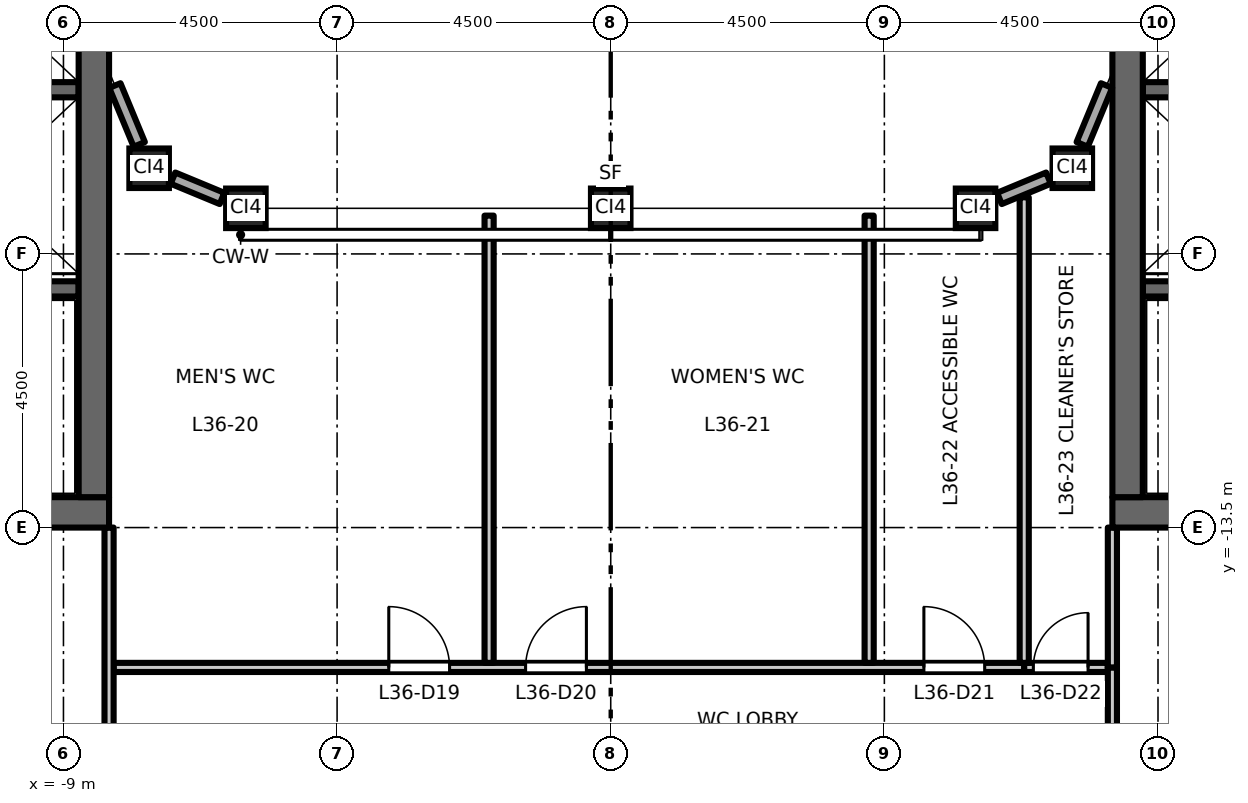
"""IFC4 building model, lengths in metres.
Left out: names, types, materials, properties, quantities, classifications, styles, units other than length and angle.
Written with IfcOpenShell. Run it as: python <this file> out.ifc"""

import sys

from ifc_helpers import new_model, si_unit, direction, frame, frame_2d, origin, origin_2d, place, context, subcontext, project, spatial, rectangle, hollow_rectangle, extrude, element, fill, save


model = new_model("IFC4")
c1 = context("Model", 3, precision=1e-05, world=origin(), true_north=direction((0.0, 1.0)))
c2 = subcontext(c1, "Body", "Model", "MODEL_VIEW")
j1 = project(units=[si_unit("LENGTHUNIT", "METRE"), si_unit("PLANEANGLEUNIT", "RADIAN")], contexts=[c1])
p1 = place(None, origin())
s1 = spatial("IfcSite", under=j1, at=p1, CompositionType="ELEMENT")
p2 = place(p1, origin())
s2 = spatial("IfcBuilding", under=s1, at=p2, CompositionType="ELEMENT")
p3 = place(p2, frame((0.0, 0.0, 167.7)))
s3 = spatial("IfcBuildingStorey", under=s2, at=p3, CompositionType="ELEMENT", Elevation=167.7)
for number, where, z_axis, x_axis in (
    (1, (-7.591, -7.591, 0.0), (0.0, 0.0, 1.0), (1.0, 0.0, 0.0)),
    (2, (-6.0, -8.25, 0.0), (0.0, 0.0, 1.0), (1.0, 0.0, 0.0)),
    (3, (0.0, -8.25, 0.0), (0.0, 0.0, 1.0), (1.0, 0.0, 0.0)),
    (4, (6.0, -8.25, 0.0), (0.0, 0.0, 1.0), (1.0, 0.0, 0.0)),
    (5, (7.591, -7.591, 0.0), (0.0, 0.0, 1.0), (1.0, 0.0, 0.0)),
):
    element("IfcColumn", number, at=place(p3, frame(where, z_axis=z_axis, x_axis=x_axis)), inside=s3, PredefinedType="COLUMN", context=c2, shape_type="SweptSolid", body=[
        extrude(hollow_rectangle(XDim=0.65, YDim=0.65, WallThickness=0.036, at=origin_2d()), origin(), (0.0, 0.0, 1.0), 4.5),
    ])
p4 = place(p3, frame((-8.75, -6.3, 0.0), z_axis=(0.0, 0.0, 1.0), x_axis=(-1.0, 0.0, 0.0)))
e6 = element("IfcWall", 6, at=p4, inside=s3, PredefinedType="SHEAR", context=c2, shape_type="SweptSolid", body=[
    extrude(rectangle(XDim=3.1, YDim=0.25, at=frame_2d((1.55, 0.0))), origin(), (0.0, 0.0, 1.0), 4.35),
])
p5 = place(p3, frame((-8.75, -9.575, 0.0), z_axis=(0.0, 0.0, 1.0), x_axis=(-1.0, 0.0, 0.0)))
e7 = element("IfcWall", 7, at=p5, inside=s3, PredefinedType="SHEAR", context=c2, shape_type="SweptSolid", body=[
    extrude(rectangle(XDim=8.0, YDim=0.25, at=frame_2d((4.0, 0.0))), origin(), (0.0, 0.0, 1.0), 4.35),
])
p6 = place(p5, frame((6.65, 0.0, 0.0)))
e8 = element("IfcOpeningElement", 8, at=p6, cuts=e7, PredefinedType="OPENING", context=c2, shape_type="SweptSolid", body=[
    extrude(rectangle(XDim=1.1, YDim=2.1, at=frame_2d((0.55, 1.05))), frame((0.0, 0.135, 0.0), z_axis=(0.0, -1.0, 0.0), x_axis=(1.0, 0.0, 0.0)), (0.0, 0.0, 1.0), 0.27),
])
p7 = place(p3, frame((-8.25, -13.25, 0.0), z_axis=(0.0, 0.0, 1.0), x_axis=(-1.0, 0.0, 0.0)))
e9 = element("IfcWall", 9, at=p7, inside=s3, PredefinedType="SHEAR", context=c2, shape_type="SweptSolid", body=[
    extrude(rectangle(XDim=13.5, YDim=0.5, at=frame_2d((6.75, 0.0))), origin(), (0.0, 0.0, 1.0), 4.35),
])
p8 = place(p3, frame((-8.5, -13.0, 0.0), z_axis=(0.0, 0.0, 1.0), x_axis=(0.0, 1.0, 0.0)))
e10 = element("IfcWall", 10, at=p8, inside=s3, PredefinedType="SHEAR", context=c2, shape_type="SweptSolid", body=[
    extrude(rectangle(XDim=26.0, YDim=0.5, at=frame_2d((13.0, 0.0))), origin(), (0.0, 0.0, 1.0), 4.35),
])
p9 = place(p3, frame((8.75, -6.3, 0.0), z_axis=(0.0, 0.0, 1.0), x_axis=(1.0, 0.0, 0.0)))
e11 = element("IfcWall", 11, at=p9, inside=s3, PredefinedType="SHEAR", context=c2, shape_type="SweptSolid", body=[
    extrude(rectangle(XDim=3.1, YDim=0.25, at=frame_2d((1.55, 0.0))), origin(), (0.0, 0.0, 1.0), 4.35),
])
p10 = place(p3, frame((8.75, -9.575, 0.0), z_axis=(0.0, 0.0, 1.0), x_axis=(1.0, 0.0, 0.0)))
e12 = element("IfcWall", 12, at=p10, inside=s3, PredefinedType="SHEAR", context=c2, shape_type="SweptSolid", body=[
    extrude(rectangle(XDim=8.0, YDim=0.25, at=frame_2d((4.0, 0.0))), origin(), (0.0, 0.0, 1.0), 4.35),
])
p11 = place(p10, frame((6.65, 0.0, 0.0)))
e13 = element("IfcOpeningElement", 13, at=p11, cuts=e12, PredefinedType="OPENING", context=c2, shape_type="SweptSolid", body=[
    extrude(rectangle(XDim=1.1, YDim=2.1, at=frame_2d((0.55, 1.05))), frame((0.0, 0.135, 0.0), z_axis=(0.0, -1.0, 0.0), x_axis=(1.0, 0.0, 0.0)), (0.0, 0.0, 1.0), 0.27),
])
p12 = place(p3, frame((8.25, -13.25, 0.0), z_axis=(0.0, 0.0, 1.0), x_axis=(1.0, 0.0, 0.0)))
e14 = element("IfcWall", 14, at=p12, inside=s3, PredefinedType="SHEAR", context=c2, shape_type="SweptSolid", body=[
    extrude(rectangle(XDim=13.5, YDim=0.5, at=frame_2d((6.75, 0.0))), origin(), (0.0, 0.0, 1.0), 4.35),
])
p13 = place(p3, frame((8.5, -13.0, 0.0), z_axis=(0.0, 0.0, 1.0), x_axis=(0.0, 1.0, 0.0)))
e15 = element("IfcWall", 15, at=p13, inside=s3, PredefinedType="SHEAR", context=c2, shape_type="SweptSolid", body=[
    extrude(rectangle(XDim=26.0, YDim=0.5, at=frame_2d((13.0, 0.0))), origin(), (0.0, 0.0, 1.0), 4.35),
])
p14 = place(p3, frame((6.392, -8.087, 0.0), z_axis=(0.0, 0.0, 1.0), x_axis=(0.923894108428, 0.382648241093, 0.0)))
e16 = element("IfcWall", 16, at=p14, inside=s3, PredefinedType="STANDARD", context=c2, shape_type="SweptSolid", body=[
    extrude(rectangle(XDim=0.873, YDim=0.2, at=frame_2d((0.437, 0.0))), origin(), (0.0, 0.0, 1.0), 3.826),
])
for number, where, z_axis, x_axis in (
    (17, (7.753, -7.199, 0.0), (0.0, 0.0, 1.0), (0.383, 0.924, 0.0)),
    (18, (-8.154, -6.231, 0.0), (0.0, 0.0, 1.0), (0.383, -0.924, 0.0)),
):
    element("IfcWall", number, at=place(p3, frame(where, z_axis=z_axis, x_axis=x_axis)), inside=s3, PredefinedType="STANDARD", context=c2, shape_type="SweptSolid", body=[
        extrude(rectangle(XDim=1.048, YDim=0.2, at=frame_2d((0.524, 0.0))), origin(), (0.0, 0.0, 1.0), 3.826),
    ])
p15 = place(p3, frame((-7.199, -7.753, 0.0), z_axis=(0.0, 0.0, 1.0), x_axis=(0.923894108428, -0.382648241093, 0.0)))
e19 = element("IfcWall", 19, at=p15, inside=s3, PredefinedType="STANDARD", context=c2, shape_type="SweptSolid", body=[
    extrude(rectangle(XDim=0.873, YDim=0.2, at=frame_2d((0.437, 0.0))), origin(), (0.0, 0.0, 1.0), 3.826),
])
p16 = place(p3, frame((-8.175, -15.8, 0.0), z_axis=(0.0, 0.0, 1.0), x_axis=(1.0, 0.0, 0.0)))
e20 = element("IfcWall", 20, at=p16, inside=s3, PredefinedType="PARTITIONING", context=c2, shape_type="SweptSolid", body=[
    extrude(rectangle(XDim=14.975, YDim=0.15, at=frame_2d((7.488, 0.0))), origin(), (0.0, 0.0, 1.0), 4.35),
])
p17 = place(p16, frame((4.525, 0.0, 0.0)))
e21 = element("IfcOpeningElement", 21, at=p17, cuts=e20, PredefinedType="OPENING", context=c2, shape_type="SweptSolid", body=[
    extrude(rectangle(XDim=1.0, YDim=2.1, at=frame_2d((0.5, 1.05))), frame((0.0, 0.085, 0.0), z_axis=(0.0, -1.0, 0.0), x_axis=(1.0, 0.0, 0.0)), (0.0, 0.0, 1.0), 0.17),
])
p18 = place(p16, frame((6.775, 0.0, 0.0)))
e22 = element("IfcOpeningElement", 22, at=p18, cuts=e20, PredefinedType="OPENING", context=c2, shape_type="SweptSolid", body=[
    extrude(rectangle(XDim=1.0, YDim=2.1, at=frame_2d((0.5, 1.05))), frame((0.0, 0.085, 0.0), z_axis=(0.0, -1.0, 0.0), x_axis=(1.0, 0.0, 0.0)), (0.0, 0.0, 1.0), 0.17),
])
p19 = place(p16, frame((13.325, 0.0, 0.0)))
e23 = element("IfcOpeningElement", 23, at=p19, cuts=e20, PredefinedType="OPENING", context=c2, shape_type="SweptSolid", body=[
    extrude(rectangle(XDim=1.0, YDim=2.1, at=frame_2d((0.5, 1.05))), frame((0.0, 0.085, 0.0), z_axis=(0.0, -1.0, 0.0), x_axis=(1.0, 0.0, 0.0)), (0.0, 0.0, 1.0), 0.17),
])
p20 = place(p3, frame((6.8, -15.8, 0.0), z_axis=(0.0, 0.0, 1.0), x_axis=(1.0, 0.0, 0.0)))
e24 = element("IfcWall", 24, at=p20, inside=s3, PredefinedType="PARTITIONING", context=c2, shape_type="SweptSolid", body=[
    extrude(rectangle(XDim=1.375, YDim=0.15, at=frame_2d((0.688, 0.0))), origin(), (0.0, 0.0, 1.0), 4.35),
])
p21 = place(p20, frame((0.15, 0.0, 0.0)))
e25 = element("IfcOpeningElement", 25, at=p21, cuts=e24, PredefinedType="OPENING", context=c2, shape_type="SweptSolid", body=[
    extrude(rectangle(XDim=0.9, YDim=2.1, at=frame_2d((0.45, 1.05))), frame((0.0, 0.085, 0.0), z_axis=(0.0, -1.0, 0.0), x_axis=(1.0, 0.0, 0.0)), (0.0, 0.0, 1.0), 0.17),
])
p22 = place(p3, frame((-8.25, -17.925, 0.0), z_axis=(0.0, 0.0, 1.0), x_axis=(0.0, 1.0, 0.0)))
e26 = element("IfcWall", 26, at=p22, inside=s3, PredefinedType="PARTITIONING", context=c2, shape_type="SweptSolid", body=[
    extrude(rectangle(XDim=4.425, YDim=0.15, at=frame_2d((2.212, 0.0))), origin(), (0.0, 0.0, 1.0), 4.35),
])
for number, where, z_axis, x_axis in (
    (27, (-2.0, -15.725, 0.0), (0.0, 0.0, 1.0), (0.0, 1.0, 0.0)),
    (28, (4.25, -15.725, 0.0), (0.0, 0.0, 1.0), (0.0, 1.0, 0.0)),
):
    element("IfcWall", number, at=place(p3, frame(where, z_axis=z_axis, x_axis=x_axis)), inside=s3, PredefinedType="PARTITIONING", context=c2, shape_type="SweptSolid", body=[
        extrude(rectangle(XDim=7.355, YDim=0.15, at=frame_2d((3.677, 0.0))), origin(), (0.0, 0.0, 1.0), 4.35),
    ])
p23 = place(p3, frame((6.8, -15.725, 0.0), z_axis=(0.0, 0.0, 1.0), x_axis=(0.0, 1.0, 0.0)))
e29 = element("IfcWall", 29, at=p23, inside=s3, PredefinedType="PARTITIONING", context=c2, shape_type="SweptSolid", body=[
    extrude(rectangle(XDim=7.656, YDim=0.15, at=frame_2d((3.828, 0.0))), origin(), (0.0, 0.0, 1.0), 4.35),
])
p24 = place(p3, frame((8.25, -17.925, 0.0), z_axis=(0.0, 0.0, 1.0), x_axis=(0.0, 1.0, 0.0)))
e30 = element("IfcWall", 30, at=p24, inside=s3, PredefinedType="PARTITIONING", context=c2, shape_type="SweptSolid", body=[
    extrude(rectangle(XDim=2.125, YDim=0.15, at=frame_2d((1.062, 0.0))), origin(), (0.0, 0.0, 1.0), 4.35),
])
p25 = place(p3, frame((8.25, -15.8, 0.0), z_axis=(0.0, 0.0, 1.0), x_axis=(0.0, 1.0, 0.0)))
e31 = element("IfcWall", 31, at=p25, inside=s3, PredefinedType="PARTITIONING", context=c2, shape_type="SweptSolid", body=[
    extrude(rectangle(XDim=2.3, YDim=0.15, at=frame_2d((1.15, 0.0))), origin(), (0.0, 0.0, 1.0), 4.35),
])
p26 = place(p17, origin())
e32 = element("IfcDoor", 32, at=p26, inside=s3, OperationType="SINGLE_SWING_LEFT", PredefinedType="DOOR", context=c2, shape_type="SweptSolid", body=[
    extrude(rectangle(XDim=1.0, YDim=2.1, at=frame_2d((0.5, 1.05))), frame((0.0, 0.025, 0.0), z_axis=(0.0, -1.0, 0.0), x_axis=(1.0, 0.0, 0.0)), (0.0, 0.0, 1.0), 0.05),
])
fill(e21, e32)
p27 = place(p18, origin())
e33 = element("IfcDoor", 33, at=p27, inside=s3, OperationType="SINGLE_SWING_RIGHT", PredefinedType="DOOR", context=c2, shape_type="SweptSolid", body=[
    extrude(rectangle(XDim=1.0, YDim=2.1, at=frame_2d((0.5, 1.05))), frame((0.0, 0.025, 0.0), z_axis=(0.0, -1.0, 0.0), x_axis=(1.0, 0.0, 0.0)), (0.0, 0.0, 1.0), 0.05),
])
fill(e22, e33)
p28 = place(p19, origin())
e34 = element("IfcDoor", 34, at=p28, inside=s3, OperationType="SINGLE_SWING_LEFT", PredefinedType="DOOR", context=c2, shape_type="SweptSolid", body=[
    extrude(rectangle(XDim=1.0, YDim=2.1, at=frame_2d((0.5, 1.05))), frame((0.0, 0.025, 0.0), z_axis=(0.0, -1.0, 0.0), x_axis=(1.0, 0.0, 0.0)), (0.0, 0.0, 1.0), 0.05),
])
fill(e23, e34)
p29 = place(p21, origin())
e35 = element("IfcDoor", 35, at=p29, inside=s3, OperationType="SINGLE_SWING_RIGHT", PredefinedType="DOOR", context=c2, shape_type="SweptSolid", body=[
    extrude(rectangle(XDim=0.9, YDim=2.1, at=frame_2d((0.45, 1.05))), frame((0.0, 0.025, 0.0), z_axis=(0.0, -1.0, 0.0), x_axis=(1.0, 0.0, 0.0)), (0.0, 0.0, 1.0), 0.05),
])
fill(e25, e35)
save(model, sys.argv[1])
